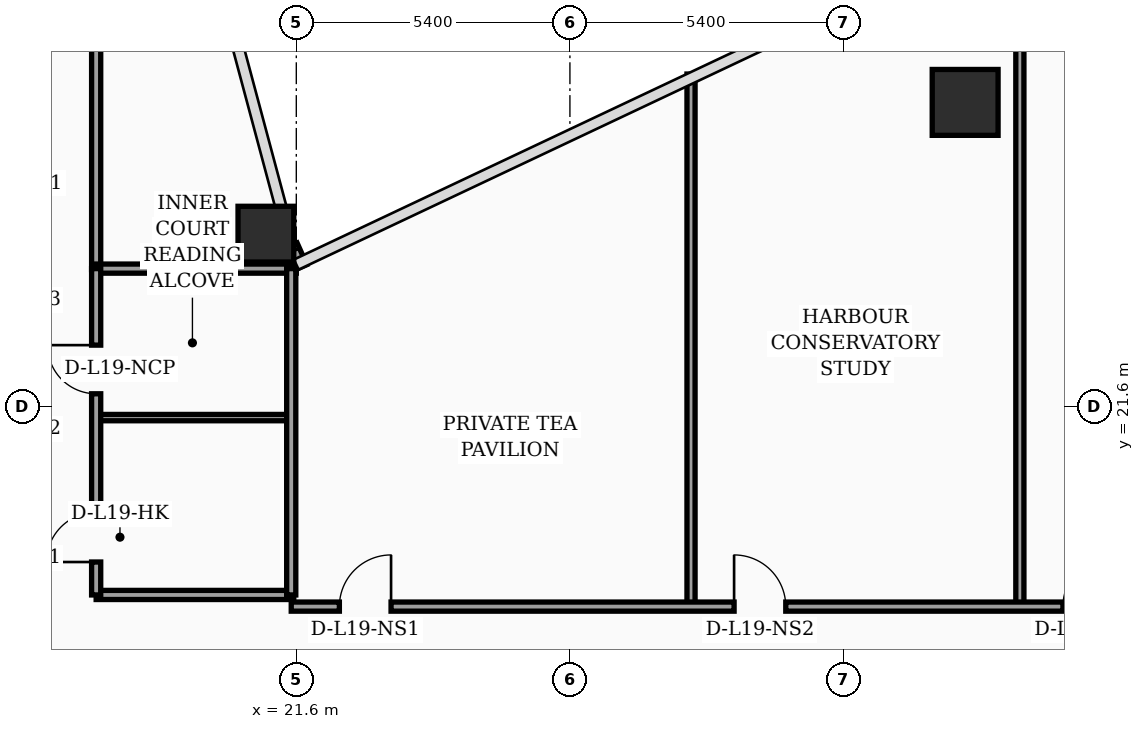
"""IFC4 building model, lengths in metres.
Left out: names, types, materials, properties, quantities, classifications, styles, units other than length and angle.
Written with IfcOpenShell. Run it as: python <this file> out.ifc"""

import sys

from ifc_helpers import new_model, si_unit, direction, frame, frame_2d, origin, origin_2d, place, context, subcontext, project, spatial, rectangle, hollow_rectangle, circle, extrude, element, fill, save


model = new_model("IFC4")
c1 = context("Model", 3, precision=1e-05, world=origin(), true_north=direction((0.0, 1.0)))
c2 = subcontext(c1, "Body", "Model", "MODEL_VIEW")
j1 = project(units=[si_unit("LENGTHUNIT", "METRE"), si_unit("PLANEANGLEUNIT", "RADIAN")], contexts=[c1])
p1 = place(None, origin())
s1 = spatial("IfcSite", under=j1, at=p1, CompositionType="ELEMENT")
p2 = place(p1, origin())
s2 = spatial("IfcBuilding", under=s1, at=p2, CompositionType="ELEMENT")
p3 = place(p2, frame((0.0, 0.0, 81.2)))
s3 = spatial("IfcBuildingStorey", under=s2, at=p3, CompositionType="ELEMENT", Elevation=81.2)
p4 = place(p3, frame((21.0, 25.0, 0.0), z_axis=(0.0, 0.0, 1.0), x_axis=(1.0, 0.0, 0.0)))
e1 = element("IfcColumn", 1, at=p4, inside=s3, PredefinedType="COLUMN", context=c2, shape_type="SweptSolid", body=[
    extrude(hollow_rectangle(XDim=1.1, YDim=1.1, WallThickness=0.045, at=origin_2d()), origin(), (0.0, 0.0, 1.0), 3.56),
])
p5 = place(p3, frame((34.8, 27.6, 0.0), z_axis=(0.0, 0.0, 1.0), x_axis=(1.0, 0.0, 0.0)))
e2 = element("IfcColumn", 2, at=p5, inside=s3, PredefinedType="COLUMN", context=c2, shape_type="SweptSolid", body=[
    extrude(circle(Radius=0.65, at=origin_2d()), origin(), (0.0, 0.0, 1.0), 3.56),
])
p6 = place(p3, frame((21.68, 24.34, 0.0), z_axis=(0.0, 0.0, 1.0), x_axis=(-0.40758134973, 0.913168901875, 0.0)))
e3 = element("IfcWall", 3, at=p6, inside=s3, PredefinedType="SOLIDWALL", context=c2, shape_type="SweptSolid", body=[
    extrude(rectangle(XDim=0.471, YDim=0.28, at=frame_2d((0.235, 0.0))), origin(), (0.0, 0.0, 1.0), 3.56),
])
p7 = place(p3, frame((17.65, 24.3, 0.0), z_axis=(0.0, 0.0, 1.0), x_axis=(0.0, 1.0, 0.0)))
e4 = element("IfcWall", 4, at=p7, inside=s3, PredefinedType="PARTITIONING", context=c2, shape_type="SweptSolid", body=[
    extrude(rectangle(XDim=16.4, YDim=0.18, at=frame_2d((8.2, 0.0))), origin(), (0.0, 0.0, 1.0), 2.84),
])
p8 = place(p3, frame((17.65, 17.88, 0.0), z_axis=(0.0, 0.0, 1.0), x_axis=(1.0, 0.0, 0.0)))
e5 = element("IfcWall", 5, at=p8, inside=s3, PredefinedType="PARTITIONING", context=c2, shape_type="SweptSolid", body=[
    extrude(rectangle(XDim=3.9, YDim=0.18, at=frame_2d((1.95, 0.0))), origin(), (0.0, 0.0, 1.0), 3.09),
])
p9 = place(p3, frame((17.65, 21.38, 0.0), z_axis=(0.0, 0.0, 1.0), x_axis=(1.0, 0.0, 0.0)))
e6 = element("IfcWall", 6, at=p9, inside=s3, PredefinedType="PARTITIONING", context=c2, shape_type="SweptSolid", body=[
    extrude(rectangle(XDim=3.9, YDim=0.125, at=frame_2d((1.95, 0.0))), origin(), (0.0, 0.0, 1.0), 3.56),
])
p10 = place(p3, frame((17.65, 24.32, 0.0), z_axis=(0.0, 0.0, 1.0), x_axis=(1.0, 0.0, 0.0)))
e7 = element("IfcWall", 7, at=p10, inside=s3, PredefinedType="PARTITIONING", context=c2, shape_type="SweptSolid", body=[
    extrude(rectangle(XDim=3.95, YDim=0.18, at=frame_2d((1.975, 0.0))), origin(), (0.0, 0.0, 1.0), 3.56),
])
p11 = place(p3, frame((21.5, 17.88, 0.0), z_axis=(0.0, 0.0, 1.0), x_axis=(0.0, 1.0, 0.0)))
e8 = element("IfcWall", 8, at=p11, inside=s3, PredefinedType="PARTITIONING", context=c2, shape_type="SweptSolid", body=[
    extrude(rectangle(XDim=6.44, YDim=0.18, at=frame_2d((3.22, 0.0))), origin(), (0.0, 0.0, 1.0), 3.09),
])
p12 = place(p3, frame((17.65, 17.88, 0.0), z_axis=(0.0, 0.0, 1.0), x_axis=(0.0, 1.0, 0.0)))
e9 = element("IfcWall", 9, at=p12, inside=s3, PredefinedType="PARTITIONING", context=c2, shape_type="SweptSolid", body=[
    extrude(rectangle(XDim=6.44, YDim=0.18, at=frame_2d((3.22, 0.0))), origin(), (0.0, 0.0, 1.0), 3.09),
])
p13 = place(p12, frame((0.65, 0.0, 0.0)))
e10 = element("IfcOpeningElement", 10, at=p13, cuts=e9, PredefinedType="OPENING", context=c2, shape_type="SweptSolid", body=[
    extrude(rectangle(XDim=0.98, YDim=2.15, at=frame_2d((0.49, 1.075))), frame((0.0, 0.1, 0.0), z_axis=(0.0, -1.0, 0.0), x_axis=(1.0, 0.0, 0.0)), (0.0, 0.0, 1.0), 0.2),
])
p14 = place(p12, frame((3.97, 0.0, 0.0)))
e11 = element("IfcOpeningElement", 11, at=p14, cuts=e9, PredefinedType="OPENING", context=c2, shape_type="SweptSolid", body=[
    extrude(rectangle(XDim=0.96, YDim=2.2, at=frame_2d((0.48, 1.1))), frame((0.0, 0.1, 0.0), z_axis=(0.0, -1.0, 0.0), x_axis=(1.0, 0.0, 0.0)), (0.0, 0.0, 1.0), 0.2),
])
p15 = place(p3, frame((29.39, 17.65, 0.0), z_axis=(0.0, 0.0, 1.0), x_axis=(0.0, 1.0, 0.0)))
e12 = element("IfcWall", 12, at=p15, inside=s3, PredefinedType="PARTITIONING", context=c2, shape_type="SweptSolid", body=[
    extrude(rectangle(XDim=10.51, YDim=0.16, at=frame_2d((5.255, 0.0))), origin(), (0.0, 0.0, 1.0), 2.84),
])
p16 = place(p3, frame((35.88, 17.65, 0.0), z_axis=(0.0, 0.0, 1.0), x_axis=(0.0, 1.0, 0.0)))
e13 = element("IfcWall", 13, at=p16, inside=s3, PredefinedType="PARTITIONING", context=c2, shape_type="SweptSolid", body=[
    extrude(rectangle(XDim=13.57, YDim=0.16, at=frame_2d((6.785, 0.0))), origin(), (0.0, 0.0, 1.0), 2.84),
])
p17 = place(p3, frame((21.5, 17.65, 0.0), z_axis=(0.0, 0.0, 1.0), x_axis=(1.0, 0.0, 0.0)))
e14 = element("IfcWall", 14, at=p17, inside=s3, PredefinedType="PARTITIONING", context=c2, shape_type="SweptSolid", body=[
    extrude(rectangle(XDim=28.65, YDim=0.18, at=frame_2d((14.325, 0.0))), origin(), (0.0, 0.0, 1.0), 2.84),
])
p18 = place(p17, frame((0.95, 0.0, 0.0)))
e15 = element("IfcOpeningElement", 15, at=p18, cuts=e14, PredefinedType="OPENING", context=c2, shape_type="SweptSolid", body=[
    extrude(rectangle(XDim=1.02, YDim=2.2, at=frame_2d((0.51, 1.1))), frame((0.0, 0.1, 0.0), z_axis=(0.0, -1.0, 0.0), x_axis=(1.0, 0.0, 0.0)), (0.0, 0.0, 1.0), 0.2),
])
p19 = place(p17, frame((8.74, 0.0, 0.0)))
e16 = element("IfcOpeningElement", 16, at=p19, cuts=e14, PredefinedType="OPENING", context=c2, shape_type="SweptSolid", body=[
    extrude(rectangle(XDim=1.02, YDim=2.2, at=frame_2d((0.51, 1.1))), frame((0.0, 0.1, 0.0), z_axis=(0.0, -1.0, 0.0), x_axis=(1.0, 0.0, 0.0)), (0.0, 0.0, 1.0), 0.2),
])
p20 = place(p17, frame((15.23, 0.0, 0.0)))
e17 = element("IfcOpeningElement", 17, at=p20, cuts=e14, PredefinedType="OPENING", context=c2, shape_type="SweptSolid", body=[
    extrude(rectangle(XDim=1.02, YDim=2.2, at=frame_2d((0.51, 1.1))), frame((0.0, 0.1, 0.0), z_axis=(0.0, -1.0, 0.0), x_axis=(1.0, 0.0, 0.0)), (0.0, 0.0, 1.0), 0.2),
])
p21 = place(p17, frame((22.36, 0.0, 0.0)))
e18 = element("IfcOpeningElement", 18, at=p21, cuts=e14, PredefinedType="OPENING", context=c2, shape_type="SweptSolid", body=[
    extrude(rectangle(XDim=1.02, YDim=2.2, at=frame_2d((0.51, 1.1))), frame((0.0, 0.1, 0.0), z_axis=(0.0, -1.0, 0.0), x_axis=(1.0, 0.0, 0.0)), (0.0, 0.0, 1.0), 0.2),
])
p22 = place(p13, origin())
e19 = element("IfcDoor", 19, at=p22, inside=s3, OperationType="SINGLE_SWING_LEFT", PredefinedType="DOOR", context=c2, shape_type="SweptSolid", body=[
    extrude(rectangle(XDim=0.98, YDim=2.15, at=frame_2d((0.49, 1.075))), frame((0.0, 0.025, 0.0), z_axis=(0.0, -1.0, 0.0), x_axis=(1.0, 0.0, 0.0)), (0.0, 0.0, 1.0), 0.05),
])
fill(e10, e19)
p23 = place(p14, origin())
e20 = element("IfcDoor", 20, at=p23, inside=s3, OperationType="SINGLE_SWING_RIGHT", PredefinedType="DOOR", context=c2, shape_type="SweptSolid", body=[
    extrude(rectangle(XDim=0.96, YDim=2.2, at=frame_2d((0.48, 1.1))), frame((0.0, 0.025, 0.0), z_axis=(0.0, -1.0, 0.0), x_axis=(1.0, 0.0, 0.0)), (0.0, 0.0, 1.0), 0.05),
])
fill(e11, e20)
p24 = place(p18, origin())
e21 = element("IfcDoor", 21, at=p24, inside=s3, OperationType="SINGLE_SWING_RIGHT", PredefinedType="DOOR", context=c2, shape_type="SweptSolid", body=[
    extrude(rectangle(XDim=1.02, YDim=2.2, at=frame_2d((0.51, 1.1))), frame((0.0, 0.025, 0.0), z_axis=(0.0, -1.0, 0.0), x_axis=(1.0, 0.0, 0.0)), (0.0, 0.0, 1.0), 0.05),
])
fill(e15, e21)
p25 = place(p19, origin())
e22 = element("IfcDoor", 22, at=p25, inside=s3, OperationType="SINGLE_SWING_LEFT", PredefinedType="DOOR", context=c2, shape_type="SweptSolid", body=[
    extrude(rectangle(XDim=1.02, YDim=2.2, at=frame_2d((0.51, 1.1))), frame((0.0, 0.025, 0.0), z_axis=(0.0, -1.0, 0.0), x_axis=(1.0, 0.0, 0.0)), (0.0, 0.0, 1.0), 0.05),
])
fill(e16, e22)
p26 = place(p20, origin())
e23 = element("IfcDoor", 23, at=p26, inside=s3, OperationType="SINGLE_SWING_RIGHT", PredefinedType="DOOR", context=c2, shape_type="SweptSolid", body=[
    extrude(rectangle(XDim=1.02, YDim=2.2, at=frame_2d((0.51, 1.1))), frame((0.0, 0.025, 0.0), z_axis=(0.0, -1.0, 0.0), x_axis=(1.0, 0.0, 0.0)), (0.0, 0.0, 1.0), 0.05),
])
fill(e17, e23)
save(model, sys.argv[1])
